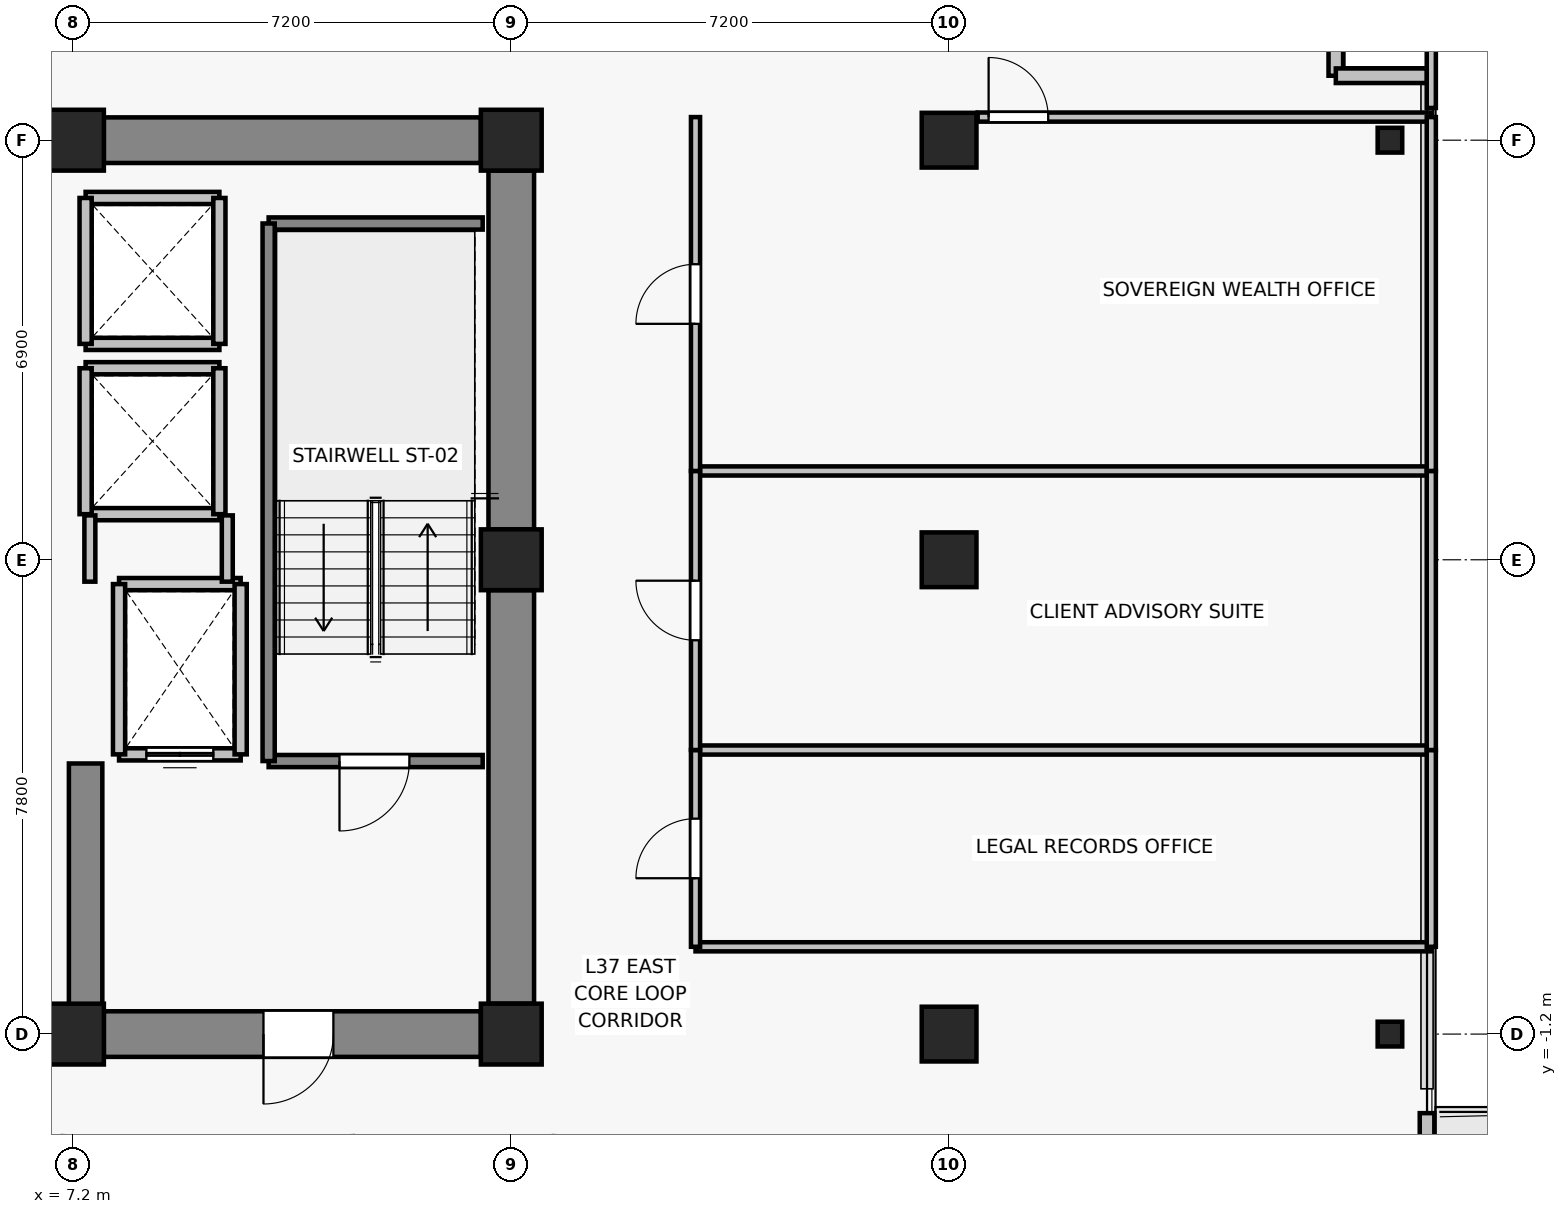
"""IFC4 building model, lengths in metres.
Left out: names, types, materials, properties, quantities, classifications, styles, units other than length and angle.
Written with IfcOpenShell. Run it as: python <this file> out.ifc"""

import sys

from ifc_helpers import new_model, si_unit, direction, frame, frame_2d, origin, origin_2d, place, context, subcontext, project, spatial, rectangle, i_section, extrude, source, transform, mapped, element, fill, save


model = new_model("IFC4")
c1 = context("Model", 3, precision=1e-05, world=origin(), true_north=direction((0.0, 1.0)))
c2 = subcontext(c1, "Body", "Model", "MODEL_VIEW")
j1 = project(units=[si_unit("LENGTHUNIT", "METRE"), si_unit("PLANEANGLEUNIT", "RADIAN")], contexts=[c1])
p1 = place(None, origin())
s1 = spatial("IfcSite", under=j1, at=p1, CompositionType="ELEMENT")
p2 = place(p1, origin())
s2 = spatial("IfcBuilding", under=s1, at=p2, CompositionType="ELEMENT")
p3 = place(p2, frame((0.0, 0.0, 133.0)))
s3 = spatial("IfcBuildingStorey", under=s2, at=p3, CompositionType="ELEMENT", Elevation=133.0)
for number, where, z_axis, x_axis in (
    (1, (7.2, -1.2, 0.0), (0.0, 0.0, 1.0), (1.0, 0.0, 0.0)),
    (2, (14.4, -1.2, 0.0), (0.0, 0.0, 1.0), (1.0, 0.0, 0.0)),
    (3, (14.4, 6.6, 0.0), (0.0, 0.0, 1.0), (1.0, 0.0, 0.0)),
    (4, (7.2, 13.5, 0.0), (0.0, 0.0, 1.0), (1.0, 0.0, 0.0)),
    (5, (14.4, 13.5, 0.0), (0.0, 0.0, 1.0), (1.0, 0.0, 0.0)),
):
    element("IfcColumn", number, at=place(p3, frame(where, z_axis=z_axis, x_axis=x_axis)), inside=s3, PredefinedType="COLUMN", context=c2, shape_type="SweptSolid", body=[
        extrude(rectangle(XDim=1.0, YDim=1.0, at=origin_2d()), origin(), (0.0, 0.0, 1.0), 3.3),
    ])
for number, where, z_axis, x_axis in (
    (6, (21.6, -1.2, 0.0), (0.0, 0.0, 1.0), (1.0, 0.0, 0.0)),
    (7, (21.6, 6.6, 0.0), (0.0, 0.0, 1.0), (1.0, 0.0, 0.0)),
    (8, (21.6, 13.5, 0.0), (0.0, 0.0, 1.0), (1.0, 0.0, 0.0)),
):
    element("IfcColumn", number, at=place(p3, frame(where, z_axis=z_axis, x_axis=x_axis)), inside=s3, PredefinedType="COLUMN", context=c2, shape_type="SweptSolid", body=[
        extrude(rectangle(XDim=0.9, YDim=0.9, at=origin_2d()), origin(), (0.0, 0.0, 1.0), 3.3),
    ])
for number, where, z_axis, x_axis in (
    (9, (28.85, -1.2, 0.0), (0.0, 0.0, 1.0), (1.0, 0.0, 0.0)),
    (10, (28.85, 13.5, 0.0), (0.0, 0.0, 1.0), (1.0, 0.0, 0.0)),
):
    element("IfcColumn", number, at=place(p3, frame(where, z_axis=z_axis, x_axis=x_axis)), inside=s3, PredefinedType="COLUMN", context=c2, shape_type="SweptSolid", body=[
        extrude(i_section(OverallWidth=0.404, OverallDepth=0.407, WebThickness=0.022, FlangeThickness=0.032, FilletRadius=0.015, at=origin_2d()), origin(), (0.0, 0.0, 1.0), 3.3),
    ])
p4 = place(p3, frame((7.7, 13.5, 0.0), z_axis=(0.0, 0.0, 1.0), x_axis=(1.0, 0.0, 0.0)))
e11 = element("IfcWall", 11, at=p4, inside=s3, PredefinedType="SHEAR", context=c2, shape_type="SweptSolid", body=[
    extrude(rectangle(XDim=6.2, YDim=0.75, at=frame_2d((3.1, 0.0))), origin(), (0.0, 0.0, 1.0), 3.075),
])
p5 = place(p3, frame((14.4, -0.7, 0.0), z_axis=(0.0, 0.0, 1.0), x_axis=(0.0, 1.0, 0.0)))
e12 = element("IfcWall", 12, at=p5, inside=s3, PredefinedType="SHEAR", context=c2, shape_type="SweptSolid", body=[
    extrude(rectangle(XDim=6.8, YDim=0.75, at=frame_2d((3.4, 0.0))), origin(), (0.0, 0.0, 1.0), 3.075),
])
p6 = place(p3, frame((14.4, 7.1, 0.0), z_axis=(0.0, 0.0, 1.0), x_axis=(0.0, 1.0, 0.0)))
e13 = element("IfcWall", 13, at=p6, inside=s3, PredefinedType="SHEAR", context=c2, shape_type="SweptSolid", body=[
    extrude(rectangle(XDim=5.9, YDim=0.75, at=frame_2d((2.95, 0.0))), origin(), (0.0, 0.0, 1.0), 3.075),
])
p7 = place(p3, frame((13.9, -1.2, 0.0), z_axis=(0.0, 0.0, 1.0), x_axis=(-1.0, 0.0, 0.0)))
e14 = element("IfcWall", 14, at=p7, inside=s3, PredefinedType="SHEAR", context=c2, shape_type="SweptSolid", body=[
    extrude(rectangle(XDim=6.2, YDim=0.75, at=frame_2d((3.1, 0.0))), origin(), (0.0, 0.0, 1.0), 3.075),
])
p8 = place(p7, frame((2.425, 0.0, 0.0)))
e15 = element("IfcOpeningElement", 15, at=p8, cuts=e14, PredefinedType="OPENING", context=c2, shape_type="SweptSolid", body=[
    extrude(rectangle(XDim=1.15, YDim=2.15, at=frame_2d((0.575, 1.075))), frame((0.0, 0.385, 0.0), z_axis=(0.0, -1.0, 0.0), x_axis=(1.0, 0.0, 0.0)), (0.0, 0.0, 1.0), 0.77),
])
p9 = place(p3, frame((7.4, -0.825, 0.0), z_axis=(0.0, 0.0, 1.0), x_axis=(0.0, 1.0, 0.0)))
e16 = element("IfcWall", 16, at=p9, inside=s3, PredefinedType="SHEAR", context=c2, shape_type="SweptSolid", body=[
    extrude(rectangle(XDim=4.075, YDim=0.55, at=frame_2d((2.038, 0.0))), origin(), (0.0, 0.0, 1.0), 3.075),
])
p10 = place(p3, frame((29.46, -2.5, 0.0), z_axis=(0.0, 0.0, 1.0), x_axis=(0.0, -1.0, 0.0)))
e17 = element("IfcWall", 17, at=p10, inside=s3, PredefinedType="SOLIDWALL", context=c2, shape_type="SweptSolid", body=[
    extrude(rectangle(XDim=5.8, YDim=0.24, at=frame_2d((2.9, 0.0))), origin(), (0.0, 0.0, 1.0), 3.075),
])
p11 = place(p10, frame((0.696, 0.0, 0.0)))
e18 = element("IfcOpeningElement", 18, at=p11, cuts=e17, PredefinedType="OPENING", context=c2, shape_type="SweptSolid", body=[
    extrude(rectangle(XDim=1.0, YDim=2.2, at=frame_2d((0.5, 1.1))), frame((0.0, 0.13, 0.0), z_axis=(0.0, -1.0, 0.0), x_axis=(1.0, 0.0, 0.0)), (0.0, 0.0, 1.0), 0.26),
])
p12 = place(p10, frame((2.046, 0.0, 0.85)))
e19 = element("IfcOpeningElement", 19, at=p12, cuts=e17, PredefinedType="OPENING", context=c2, shape_type="SweptSolid", body=[
    extrude(rectangle(XDim=1.2, YDim=1.5, at=frame_2d((0.6, 0.75))), frame((0.0, 0.13, 0.0), z_axis=(0.0, -1.0, 0.0), x_axis=(1.0, 0.0, 0.0)), (0.0, 0.0, 1.0), 0.26),
])
for number, where, z_axis, x_axis in (
    (20, (27.96, 14.56, 0.0), (0.0, 0.0, 1.0), (0.0, 1.0, 0.0)),
    (21, (29.46, 14.56, 0.0), (0.0, 0.0, 1.0), (-1.0, 0.0, 0.0)),
):
    element("IfcWall", number, at=place(p3, frame(where, z_axis=z_axis, x_axis=x_axis)), inside=s3, PredefinedType="SOLIDWALL", context=c2, shape_type="SweptSolid", body=[
        extrude(rectangle(XDim=1.5, YDim=0.24, at=frame_2d((0.75, 0.0))), origin(), (0.0, 0.0, 1.0), 3.075),
    ])
p13 = place(p3, frame((9.95, 3.4, 0.0), z_axis=(0.0, 0.0, 1.0), x_axis=(-1.0, 0.0, 0.0)))
e22 = element("IfcWall", 22, at=p13, inside=s3, PredefinedType="SOLIDWALL", context=c2, shape_type="SweptSolid", body=[
    extrude(rectangle(XDim=2.0, YDim=0.2, at=frame_2d((1.0, 0.0))), origin(), (0.0, 0.0, 1.0), 3.075),
])
p14 = place(p13, frame((0.45, 0.0, 0.0)))
e23 = element("IfcOpeningElement", 23, at=p14, cuts=e22, PredefinedType="OPENING", context=c2, shape_type="SweptSolid", body=[
    extrude(rectangle(XDim=1.1, YDim=2.2, at=frame_2d((0.55, 1.1))), frame((0.0, 0.11, 0.0), z_axis=(0.0, -1.0, 0.0), x_axis=(1.0, 0.0, 0.0)), (0.0, 0.0, 1.0), 0.22),
])
p15 = place(p3, frame((7.95, 6.2, 0.0), z_axis=(0.0, 0.0, 1.0), x_axis=(1.0, 0.0, 0.0)))
e24 = element("IfcWall", 24, at=p15, inside=s3, PredefinedType="SOLIDWALL", context=c2, shape_type="SweptSolid", body=[
    extrude(rectangle(XDim=2.0, YDim=0.2, at=frame_2d((1.0, 0.0))), origin(), (0.0, 0.0, 1.0), 3.075),
])
for number, where, z_axis, x_axis in (
    (25, (7.95, 3.4, 0.0), (0.0, 0.0, 1.0), (0.0, 1.0, 0.0)),
    (26, (9.95, 6.2, 0.0), (0.0, 0.0, 1.0), (0.0, -1.0, 0.0)),
):
    element("IfcWall", number, at=place(p3, frame(where, z_axis=z_axis, x_axis=x_axis)), inside=s3, PredefinedType="SOLIDWALL", context=c2, shape_type="SweptSolid", body=[
        extrude(rectangle(XDim=2.8, YDim=0.2, at=frame_2d((1.4, 0.0))), origin(), (0.0, 0.0, 1.0), 3.075),
    ])
for number, where, z_axis, x_axis in (
    (27, (9.6, 7.35, 0.0), (0.0, 0.0, 1.0), (-1.0, 0.0, 0.0)),
    (28, (7.4, 9.75, 0.0), (0.0, 0.0, 1.0), (1.0, 0.0, 0.0)),
):
    element("IfcWall", number, at=place(p3, frame(where, z_axis=z_axis, x_axis=x_axis)), inside=s3, PredefinedType="SOLIDWALL", context=c2, shape_type="SweptSolid", body=[
        extrude(rectangle(XDim=2.2, YDim=0.2, at=frame_2d((1.1, 0.0))), origin(), (0.0, 0.0, 1.0), 2.515),
    ])
p16 = place(p3, frame((7.4, 7.35, 0.0), z_axis=(0.0, 0.0, 1.0), x_axis=(0.0, 1.0, 0.0)))
e29 = element("IfcWall", 29, at=p16, inside=s3, PredefinedType="SOLIDWALL", context=c2, shape_type="SweptSolid", body=[
    extrude(rectangle(XDim=2.4, YDim=0.2, at=frame_2d((1.2, 0.0))), origin(), (0.0, 0.0, 1.0), 2.515),
])
p17 = place(p3, frame((9.6, 9.75, 0.0), z_axis=(0.0, 0.0, 1.0), x_axis=(0.0, -1.0, 0.0)))
e30 = element("IfcWall", 30, at=p17, inside=s3, PredefinedType="SOLIDWALL", context=c2, shape_type="SweptSolid", body=[
    extrude(rectangle(XDim=2.4, YDim=0.2, at=frame_2d((1.2, 0.0))), origin(), (0.0, 0.0, 1.0), 3.075),
])
for number, where, z_axis, x_axis in (
    (31, (9.6, 10.15, 0.0), (0.0, 0.0, 1.0), (-1.0, 0.0, 0.0)),
    (32, (7.4, 12.55, 0.0), (0.0, 0.0, 1.0), (1.0, 0.0, 0.0)),
):
    element("IfcWall", number, at=place(p3, frame(where, z_axis=z_axis, x_axis=x_axis)), inside=s3, PredefinedType="SOLIDWALL", context=c2, shape_type="SweptSolid", body=[
        extrude(rectangle(XDim=2.2, YDim=0.2, at=frame_2d((1.1, 0.0))), origin(), (0.0, 0.0, 1.0), 2.515),
    ])
p18 = place(p3, frame((7.4, 10.15, 0.0), z_axis=(0.0, 0.0, 1.0), x_axis=(0.0, 1.0, 0.0)))
e33 = element("IfcWall", 33, at=p18, inside=s3, PredefinedType="SOLIDWALL", context=c2, shape_type="SweptSolid", body=[
    extrude(rectangle(XDim=2.4, YDim=0.2, at=frame_2d((1.2, 0.0))), origin(), (0.0, 0.0, 1.0), 2.515),
])
p19 = place(p3, frame((9.6, 12.55, 0.0), z_axis=(0.0, 0.0, 1.0), x_axis=(0.0, -1.0, 0.0)))
e34 = element("IfcWall", 34, at=p19, inside=s3, PredefinedType="SOLIDWALL", context=c2, shape_type="SweptSolid", body=[
    extrude(rectangle(XDim=2.4, YDim=0.2, at=frame_2d((1.2, 0.0))), origin(), (0.0, 0.0, 1.0), 3.075),
])
p20 = place(p3, frame((13.93, 3.29, 0.0), z_axis=(0.0, 0.0, 1.0), x_axis=(-1.0, 0.0, 0.0)))
e35 = element("IfcWall", 35, at=p20, inside=s3, PredefinedType="SOLIDWALL", context=c2, shape_type="SweptSolid", body=[
    extrude(rectangle(XDim=3.52, YDim=0.2, at=frame_2d((1.76, 0.0))), origin(), (0.0, 0.0, 1.0), 3.075),
])
p21 = place(p20, frame((1.205, 0.0, 0.0)))
e36 = element("IfcOpeningElement", 36, at=p21, cuts=e35, PredefinedType="OPENING", context=c2, shape_type="SweptSolid", body=[
    extrude(rectangle(XDim=1.15, YDim=2.15, at=frame_2d((0.575, 1.075))), frame((0.0, 0.11, 0.0), z_axis=(0.0, -1.0, 0.0), x_axis=(1.0, 0.0, 0.0)), (0.0, 0.0, 1.0), 0.22),
])
p22 = place(p3, frame((10.41, 12.13, 0.0), z_axis=(0.0, 0.0, 1.0), x_axis=(1.0, 0.0, 0.0)))
e37 = element("IfcWall", 37, at=p22, inside=s3, PredefinedType="SOLIDWALL", context=c2, shape_type="SweptSolid", body=[
    extrude(rectangle(XDim=3.52, YDim=0.2, at=frame_2d((1.76, 0.0))), origin(), (0.0, 0.0, 1.0), 3.075),
])
p23 = place(p3, frame((10.41, 3.29, 0.0), z_axis=(0.0, 0.0, 1.0), x_axis=(0.0, 1.0, 0.0)))
e38 = element("IfcWall", 38, at=p23, inside=s3, PredefinedType="SOLIDWALL", context=c2, shape_type="SweptSolid", body=[
    extrude(rectangle(XDim=8.84, YDim=0.2, at=frame_2d((4.42, 0.0))), origin(), (0.0, 0.0, 1.0), 3.075),
])
p24 = place(p3, frame((7.47, 6.24, 0.0), z_axis=(0.0, 0.0, 1.0), x_axis=(0.0, 1.0, 0.0)))
e39 = element("IfcWall", 39, at=p24, inside=s3, PredefinedType="PARTITIONING", context=c2, shape_type="SweptSolid", body=[
    extrude(rectangle(XDim=1.09, YDim=0.18, at=frame_2d((0.545, 0.0))), origin(), (0.0, 0.0, 1.0), 2.515),
])
p25 = place(p3, frame((9.73, 7.33, 0.0), z_axis=(0.0, 0.0, 1.0), x_axis=(0.0, -1.0, 0.0)))
e40 = element("IfcWall", 40, at=p25, inside=s3, PredefinedType="PARTITIONING", context=c2, shape_type="SweptSolid", body=[
    extrude(rectangle(XDim=1.09, YDim=0.18, at=frame_2d((0.545, 0.0))), origin(), (0.0, 0.0, 1.0), 3.075),
])
for number, where, z_axis, x_axis in (
    (41, (29.53, 0.236, 0.0), (0.0, 0.0, 1.0), (-1.0, 0.0, 0.0)),
    (42, (17.43, 3.471, 0.0), (0.0, 0.0, 1.0), (1.0, 0.0, 0.0)),
):
    element("IfcWall", number, at=place(p3, frame(where, z_axis=z_axis, x_axis=x_axis)), inside=s3, PredefinedType="PARTITIONING", context=c2, shape_type="SweptSolid", body=[
        extrude(rectangle(XDim=12.1, YDim=0.15, at=frame_2d((6.05, 0.0))), origin(), (0.0, 0.0, 1.0), 2.515),
    ])
p26 = place(p3, frame((17.43, 0.236, 0.0), z_axis=(0.0, 0.0, 1.0), x_axis=(0.0, 1.0, 0.0)))
e43 = element("IfcWall", 43, at=p26, inside=s3, PredefinedType="PARTITIONING", context=c2, shape_type="SweptSolid", body=[
    extrude(rectangle(XDim=3.236, YDim=0.15, at=frame_2d((1.618, 0.0))), origin(), (0.0, 0.0, 1.0), 3.075),
])
p27 = place(p26, frame((1.127, 0.0, 0.0)))
e44 = element("IfcOpeningElement", 44, at=p27, cuts=e43, PredefinedType="OPENING", context=c2, shape_type="SweptSolid", body=[
    extrude(rectangle(XDim=0.98, YDim=2.15, at=frame_2d((0.49, 1.075))), frame((0.0, 0.085, 0.0), z_axis=(0.0, -1.0, 0.0), x_axis=(1.0, 0.0, 0.0)), (0.0, 0.0, 1.0), 0.17),
])
p28 = place(p3, frame((29.53, 3.471, 0.0), z_axis=(0.0, 0.0, 1.0), x_axis=(0.0, -1.0, 0.0)))
e45 = element("IfcWall", 45, at=p28, inside=s3, PredefinedType="PARTITIONING", context=c2, shape_type="SweptSolid", body=[
    extrude(rectangle(XDim=3.236, YDim=0.15, at=frame_2d((1.618, 0.0))), origin(), (0.0, 0.0, 1.0), 3.075),
])
p29 = place(p3, frame((17.43, 8.061, 0.0), z_axis=(0.0, 0.0, 1.0), x_axis=(1.0, 0.0, 0.0)))
e46 = element("IfcWall", 46, at=p29, inside=s3, PredefinedType="PARTITIONING", context=c2, shape_type="SweptSolid", body=[
    extrude(rectangle(XDim=12.1, YDim=0.15, at=frame_2d((6.05, 0.0))), origin(), (0.0, 0.0, 1.0), 2.515),
])
p30 = place(p3, frame((17.43, 3.471, 0.0), z_axis=(0.0, 0.0, 1.0), x_axis=(0.0, 1.0, 0.0)))
e47 = element("IfcWall", 47, at=p30, inside=s3, PredefinedType="PARTITIONING", context=c2, shape_type="SweptSolid", body=[
    extrude(rectangle(XDim=4.589, YDim=0.15, at=frame_2d((2.295, 0.0))), origin(), (0.0, 0.0, 1.0), 2.515),
])
p31 = place(p30, frame((1.805, 0.0, 0.0)))
e48 = element("IfcOpeningElement", 48, at=p31, cuts=e47, PredefinedType="OPENING", context=c2, shape_type="SweptSolid", body=[
    extrude(rectangle(XDim=0.98, YDim=2.15, at=frame_2d((0.49, 1.075))), frame((0.0, 0.085, 0.0), z_axis=(0.0, -1.0, 0.0), x_axis=(1.0, 0.0, 0.0)), (0.0, 0.0, 1.0), 0.17),
])
p32 = place(p3, frame((29.53, 8.061, 0.0), z_axis=(0.0, 0.0, 1.0), x_axis=(0.0, -1.0, 0.0)))
e49 = element("IfcWall", 49, at=p32, inside=s3, PredefinedType="PARTITIONING", context=c2, shape_type="SweptSolid", body=[
    extrude(rectangle(XDim=4.589, YDim=0.15, at=frame_2d((2.295, 0.0))), origin(), (0.0, 0.0, 1.0), 3.075),
])
p33 = place(p3, frame((22.07, 13.88, 0.0), z_axis=(0.0, 0.0, 1.0), x_axis=(1.0, 0.0, 0.0)))
e50 = element("IfcWall", 50, at=p33, inside=s3, PredefinedType="PARTITIONING", context=c2, shape_type="SweptSolid", body=[
    extrude(rectangle(XDim=7.46, YDim=0.15, at=frame_2d((3.73, 0.0))), origin(), (0.0, 0.0, 1.0), 3.075),
])
p34 = place(p33, frame((0.18, 0.0, 0.0)))
e51 = element("IfcOpeningElement", 51, at=p34, cuts=e50, PredefinedType="OPENING", context=c2, shape_type="SweptSolid", body=[
    extrude(rectangle(XDim=0.98, YDim=2.15, at=frame_2d((0.49, 1.075))), frame((0.0, 0.085, 0.0), z_axis=(0.0, -1.0, 0.0), x_axis=(1.0, 0.0, 0.0)), (0.0, 0.0, 1.0), 0.17),
])
p35 = place(p3, frame((17.43, 8.061, 0.0), z_axis=(0.0, 0.0, 1.0), x_axis=(0.0, 1.0, 0.0)))
e52 = element("IfcWall", 52, at=p35, inside=s3, PredefinedType="PARTITIONING", context=c2, shape_type="SweptSolid", body=[
    extrude(rectangle(XDim=5.819, YDim=0.15, at=frame_2d((2.91, 0.0))), origin(), (0.0, 0.0, 1.0), 2.515),
])
p36 = place(p35, frame((2.419, 0.0, 0.0)))
e53 = element("IfcOpeningElement", 53, at=p36, cuts=e52, PredefinedType="OPENING", context=c2, shape_type="SweptSolid", body=[
    extrude(rectangle(XDim=0.98, YDim=2.15, at=frame_2d((0.49, 1.075))), frame((0.0, 0.085, 0.0), z_axis=(0.0, -1.0, 0.0), x_axis=(1.0, 0.0, 0.0)), (0.0, 0.0, 1.0), 0.17),
])
p37 = place(p3, frame((29.53, 13.88, 0.0), z_axis=(0.0, 0.0, 1.0), x_axis=(0.0, -1.0, 0.0)))
e54 = element("IfcWall", 54, at=p37, inside=s3, PredefinedType="PARTITIONING", context=c2, shape_type="SweptSolid", body=[
    extrude(rectangle(XDim=5.819, YDim=0.15, at=frame_2d((2.91, 0.0))), origin(), (0.0, 0.0, 1.0), 3.075),
])
p38 = place(p3, frame((29.53, 17.63, 0.0), z_axis=(0.0, 0.0, 1.0), x_axis=(0.0, -1.0, 0.0)))
e55 = element("IfcWall", 55, at=p38, inside=s3, PredefinedType="PARTITIONING", context=c2, shape_type="SweptSolid", body=[
    extrude(rectangle(XDim=3.6, YDim=0.15, at=frame_2d((1.8, 0.0))), origin(), (0.0, 0.0, 1.0), 3.075),
])
m1 = source(origin(), c2, "Body", "SweptSolid", [
    extrude(rectangle(XDim=1.1, YDim=2.2, at=frame_2d((0.55, 1.1))), frame((0.0, 0.025, 0.0), z_axis=(0.0, -1.0, 0.0), x_axis=(1.0, 0.0, 0.0)), (0.0, 0.0, 1.0), 0.05),
])
p39 = place(p14, origin())
e56 = element("IfcDoor", 56, at=p39, inside=s3, OperationType="DOUBLE_DOOR_SLIDING", PredefinedType="DOOR", context=c2, shape_type="MappedRepresentation", body=[
    mapped(m1, transform((0.0, 0.0, 0.0), x_axis=(1.0, 0.0, 0.0), y_axis=(0.0, 1.0, 0.0), z_axis=(0.0, 0.0, 1.0), scale=1.0)),
])
fill(e23, e56)
m2 = source(origin(), c2, "Body", "SweptSolid", [
    extrude(rectangle(XDim=1.15, YDim=2.15, at=frame_2d((0.575, 1.075))), frame((0.0, 0.025, 0.0), z_axis=(0.0, -1.0, 0.0), x_axis=(1.0, 0.0, 0.0)), (0.0, 0.0, 1.0), 0.05),
])
p40 = place(p21, origin())
e57 = element("IfcDoor", 57, at=p40, inside=s3, OperationType="SINGLE_SWING_RIGHT", PredefinedType="DOOR", context=c2, shape_type="MappedRepresentation", body=[
    mapped(m2, transform((0.0, 0.0, 0.0), x_axis=(1.0, 0.0, 0.0), y_axis=(0.0, 1.0, 0.0), z_axis=(0.0, 0.0, 1.0), scale=1.0)),
])
fill(e36, e57)
p41 = place(p8, origin())
e58 = element("IfcDoor", 58, at=p41, inside=s3, OperationType="SINGLE_SWING_RIGHT", PredefinedType="DOOR", context=c2, shape_type="MappedRepresentation", body=[
    mapped(m2, transform((0.0, 0.0, 0.0), x_axis=(1.0, 0.0, 0.0), y_axis=(0.0, 1.0, 0.0), z_axis=(0.0, 0.0, 1.0), scale=1.0)),
])
fill(e15, e58)
m3 = source(origin(), c2, "Body", "SweptSolid", [
    extrude(rectangle(XDim=0.98, YDim=2.15, at=frame_2d((0.49, 1.075))), frame((0.0, 0.025, 0.0), z_axis=(0.0, -1.0, 0.0), x_axis=(1.0, 0.0, 0.0)), (0.0, 0.0, 1.0), 0.05),
])
p42 = place(p27, origin())
e59 = element("IfcDoor", 59, at=p42, inside=s3, OperationType="SINGLE_SWING_LEFT", PredefinedType="DOOR", context=c2, shape_type="MappedRepresentation", body=[
    mapped(m3, transform((0.0, 0.0, 0.0), x_axis=(1.0, 0.0, 0.0), y_axis=(0.0, 1.0, 0.0), z_axis=(0.0, 0.0, 1.0), scale=1.0)),
])
fill(e44, e59)
p43 = place(p31, origin())
e60 = element("IfcDoor", 60, at=p43, inside=s3, OperationType="SINGLE_SWING_RIGHT", PredefinedType="DOOR", context=c2, shape_type="MappedRepresentation", body=[
    mapped(m3, transform((0.0, 0.0, 0.0), x_axis=(1.0, 0.0, 0.0), y_axis=(0.0, 1.0, 0.0), z_axis=(0.0, 0.0, 1.0), scale=1.0)),
])
fill(e48, e60)
p44 = place(p36, origin())
e61 = element("IfcDoor", 61, at=p44, inside=s3, OperationType="SINGLE_SWING_LEFT", PredefinedType="DOOR", context=c2, shape_type="MappedRepresentation", body=[
    mapped(m3, transform((0.0, 0.0, 0.0), x_axis=(1.0, 0.0, 0.0), y_axis=(0.0, 1.0, 0.0), z_axis=(0.0, 0.0, 1.0), scale=1.0)),
])
fill(e53, e61)
p45 = place(p34, origin())
e62 = element("IfcDoor", 62, at=p45, inside=s3, OperationType="SINGLE_SWING_LEFT", PredefinedType="DOOR", context=c2, shape_type="MappedRepresentation", body=[
    mapped(m3, transform((0.0, 0.0, 0.0), x_axis=(1.0, 0.0, 0.0), y_axis=(0.0, 1.0, 0.0), z_axis=(0.0, 0.0, 1.0), scale=1.0)),
])
fill(e51, e62)
save(model, sys.argv[1])
